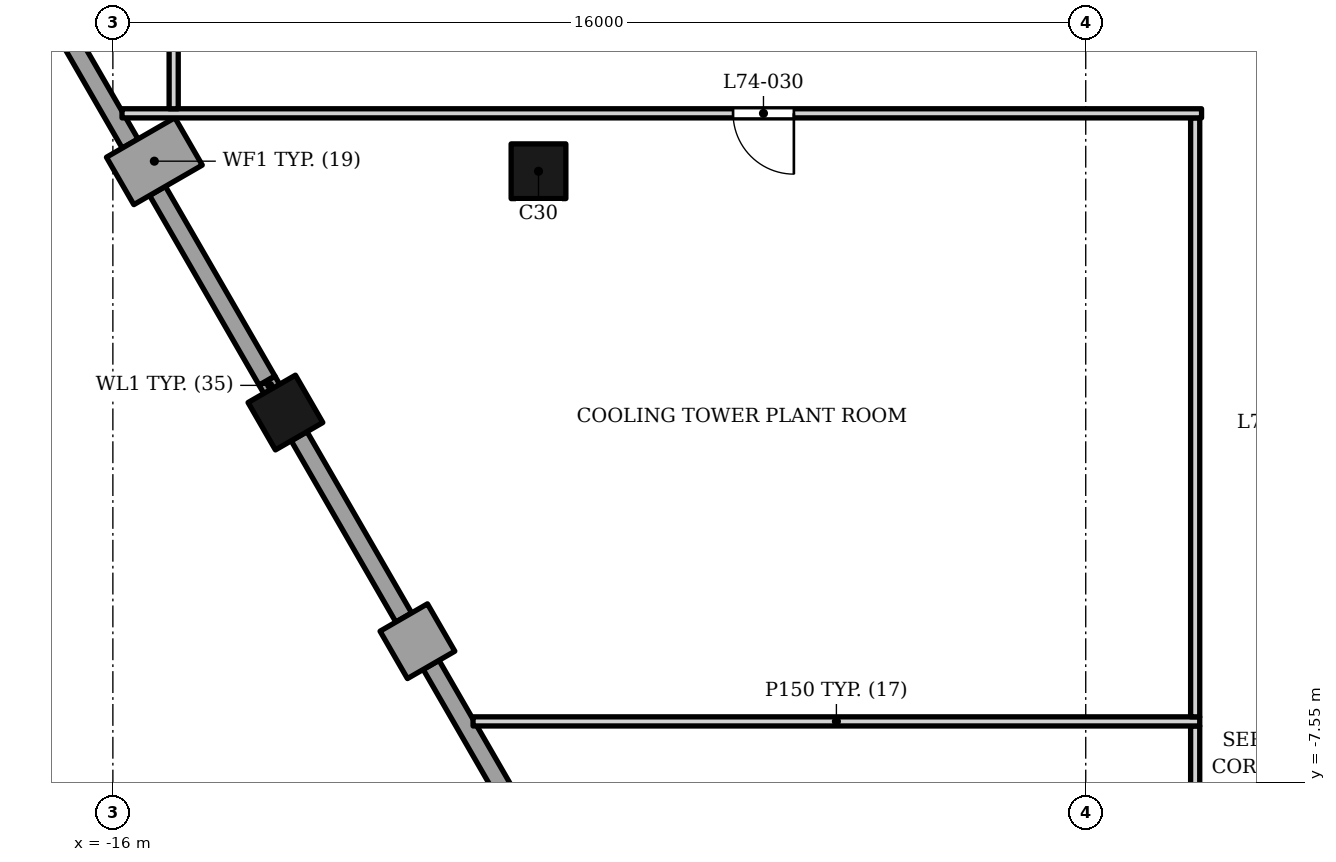
"""IFC4 building model, lengths in metres.
Left out: names, types, materials, properties, quantities, classifications, styles, units other than length and angle.
Written with IfcOpenShell. Run it as: python <this file> out.ifc"""

import sys

from ifc_helpers import new_model, si_unit, direction, frame, frame_2d, origin, origin_2d, place, context, subcontext, project, spatial, polyline, rectangle, outline, extrude, element, fill, save


model = new_model("IFC4")
c1 = context("Model", 3, precision=1e-05, world=origin(), true_north=direction((0.0, 1.0)))
c2 = subcontext(c1, "Body", "Model", "MODEL_VIEW")
j1 = project(units=[si_unit("LENGTHUNIT", "METRE"), si_unit("PLANEANGLEUNIT", "RADIAN")], contexts=[c1])
p1 = place(None, origin())
s1 = spatial("IfcSite", under=j1, at=p1, CompositionType="ELEMENT")
p2 = place(p1, origin())
s2 = spatial("IfcBuilding", under=s1, at=p2, CompositionType="ELEMENT")
p3 = place(p2, frame((0.0, 0.0, 315.5)))
s3 = spatial("IfcBuildingStorey", under=s2, at=p3, CompositionType="ELEMENT", Elevation=315.5)
for number, where, z_axis, x_axis in (
    (1, (-9.0, 2.5, 0.0), (0.0, 0.0, 1.0), (1.0, 0.0, 0.0)),
    (2, (-13.162, -1.468, 0.0), (0.0, 0.0, 1.0), (0.5, -0.866, 0.0)),
):
    element("IfcColumn", number, at=place(p3, frame(where, z_axis=z_axis, x_axis=x_axis)), inside=s3, PredefinedType="COLUMN", context=c2, shape_type="SweptSolid", body=[
        extrude(rectangle(XDim=0.9, YDim=0.9, at=origin_2d()), origin(), (0.0, 0.0, 1.0), 5.0),
    ])
p4 = place(p3, frame((-15.881, 2.341, 0.0), z_axis=(0.0, 0.0, 1.0), x_axis=(0.86611990832, 0.499836277606, 0.0)))
e3 = element("IfcWall", 3, at=p4, inside=s3, PredefinedType="SOLIDWALL", context=c2, shape_type="SweptSolid", body=[
    extrude(rectangle(XDim=1.3, YDim=0.9, at=frame_2d((0.65, 0.0))), origin(), (0.0, 0.0, 1.0), 3.8),
])
p5 = place(p3, frame((-11.216, -4.839, 0.0), z_axis=(0.0, 0.0, 1.0), x_axis=(0.500223362819, -0.865896406789, 0.0)))
e4 = element("IfcWall", 4, at=p5, inside=s3, PredefinedType="SOLIDWALL", context=c2, shape_type="SweptSolid", body=[
    extrude(rectangle(XDim=0.9, YDim=0.9, at=frame_2d((0.45, 0.0))), origin(), (0.0, 0.0, 1.0), 3.8),
])
p6 = place(p3, origin())
e5 = element("IfcWall", 5, at=p6, inside=s3, PredefinedType="ELEMENTEDWALL", context=c2, shape_type="SweptSolid", body=[
    extrude(outline(polyline([(-15.586, 3.031), (-17.307, 6.011), (-17.567, 5.861), (-15.846, 2.88), (-15.586, 3.031)])), origin(), (0.0, 0.0, 1.0), 3.8),
])
p7 = place(p3, frame((-15.266, 2.176, 0.0), z_axis=(0.0, 0.0, 1.0), x_axis=(0.499961193289, -0.866047807691, 0.0)))
e6 = element("IfcWall", 6, at=p7, inside=s3, PredefinedType="ELEMENTEDWALL", context=c2, shape_type="SweptSolid", body=[
    extrude(rectangle(XDim=3.6, YDim=0.3, at=frame_2d((1.8, 0.0))), origin(), (0.0, 0.0, 1.0), 3.8),
])
p8 = place(p3, origin())
e7 = element("IfcWall", 7, at=p8, inside=s3, PredefinedType="ELEMENTEDWALL", context=c2, shape_type="SweptSolid", body=[
    extrude(outline(polyline([(-11.086, -4.764), (-12.807, -1.783), (-13.067, -1.933), (-11.346, -4.914), (-11.086, -4.764)])), origin(), (0.0, 0.0, 1.0), 3.8),
])
p9 = place(p3, frame((-10.766, -5.618, 0.0), z_axis=(0.0, 0.0, 1.0), x_axis=(0.499961193289, -0.866047807691, 0.0)))
e8 = element("IfcWall", 8, at=p9, inside=s3, PredefinedType="ELEMENTEDWALL", context=c2, shape_type="SweptSolid", body=[
    extrude(rectangle(XDim=3.6, YDim=0.3, at=frame_2d((1.8, 0.0))), origin(), (0.0, 0.0, 1.0), 3.8),
])
p10 = place(p3, frame((-13.55, -1.096, 0.0), z_axis=(0.0, 0.0, 1.0), x_axis=(0.865778900179, 0.500426713919, 0.0)))
e9 = element("IfcWall", 9, at=p10, inside=s3, PredefinedType="ELEMENTEDWALL", context=c2, shape_type="SweptSolid", body=[
    extrude(rectangle(XDim=0.3, YDim=0.176, at=frame_2d((0.15, 0.0))), origin(), (0.0, 0.0, 1.0), 3.8),
])
p11 = place(p3, frame((1.8, -18.001, 0.0), z_axis=(0.0, 0.0, 1.0), x_axis=(0.0, 1.0, 0.0)))
e10 = element("IfcWall", 10, at=p11, inside=s3, PredefinedType="PARTITIONING", context=c2, shape_type="SweptSolid", body=[
    extrude(outline(polyline([(0.0, 0.0), (11.378, 0.0), (11.378, 4.8), (1.261, 4.8), (0.0, 3.742), (0.0, 0.0)])), frame((0.0, 0.075, 0.0), z_axis=(0.0, -1.0, 0.0), x_axis=(1.0, 0.0, 0.0)), (0.0, 0.0, 1.0), 0.15),
])
p12 = place(p11, frame((5.453, 0.0, 0.0)))
e11 = element("IfcOpeningElement", 11, at=p12, cuts=e10, PredefinedType="OPENING", context=c2, shape_type="SweptSolid", body=[
    extrude(rectangle(XDim=1.0, YDim=2.1, at=frame_2d((0.5, 1.05))), frame((0.0, 0.085, 0.0), z_axis=(0.0, -1.0, 0.0), x_axis=(1.0, 0.0, 0.0)), (0.0, 0.0, 1.0), 0.17),
])
p13 = place(p3, frame((-10.076, -6.547, 0.0), z_axis=(0.0, 0.0, 1.0), x_axis=(1.0, 0.0, 0.0)))
e12 = element("IfcWall", 12, at=p13, inside=s3, PredefinedType="PARTITIONING", context=c2, shape_type="SweptSolid", body=[
    extrude(rectangle(XDim=11.951, YDim=0.15, at=frame_2d((5.976, 0.0))), origin(), (0.0, 0.0, 1.0), 4.272),
])
p14 = place(p3, frame((1.8, -6.472, 0.0), z_axis=(0.0, 0.0, 1.0), x_axis=(0.0, 1.0, 0.0)))
e13 = element("IfcWall", 13, at=p14, inside=s3, PredefinedType="PARTITIONING", context=c2, shape_type="SweptSolid", body=[
    extrude(rectangle(XDim=9.85, YDim=0.15, at=frame_2d((4.925, 0.0))), origin(), (0.0, 0.0, 1.0), 4.8),
])
p15 = place(p3, frame((-15.85, 3.453, 0.0), z_axis=(0.0, 0.0, 1.0), x_axis=(1.0, 0.0, 0.0)))
e14 = element("IfcWall", 14, at=p15, inside=s3, PredefinedType="PARTITIONING", context=c2, shape_type="SweptSolid", body=[
    extrude(rectangle(XDim=17.755, YDim=0.15, at=frame_2d((8.877, 0.0))), origin(), (0.0, 0.0, 1.0), 4.1),
])
p16 = place(p15, frame((10.05, 0.0, 0.0)))
e15 = element("IfcOpeningElement", 15, at=p16, cuts=e14, PredefinedType="OPENING", context=c2, shape_type="SweptSolid", body=[
    extrude(rectangle(XDim=1.0, YDim=2.1, at=frame_2d((0.5, 1.05))), frame((0.0, 0.085, 0.0), z_axis=(0.0, -1.0, 0.0), x_axis=(1.0, 0.0, 0.0)), (0.0, 0.0, 1.0), 0.17),
])
p17 = place(p3, frame((-15.0, 3.528, 0.0), z_axis=(0.0, 0.0, 1.0), x_axis=(0.0, 1.0, 0.0)))
e16 = element("IfcWall", 16, at=p17, inside=s3, PredefinedType="PARTITIONING", context=c2, shape_type="SweptSolid", body=[
    extrude(rectangle(XDim=7.65, YDim=0.15, at=frame_2d((3.825, 0.0))), origin(), (0.0, 0.0, 1.0), 4.02),
])
p18 = place(p17, frame((3.275, 0.0, 0.0)))
e17 = element("IfcOpeningElement", 17, at=p18, cuts=e16, PredefinedType="OPENING", context=c2, shape_type="SweptSolid", body=[
    extrude(rectangle(XDim=1.0, YDim=2.1, at=frame_2d((0.5, 1.05))), frame((0.0, 0.085, 0.0), z_axis=(0.0, -1.0, 0.0), x_axis=(1.0, 0.0, 0.0)), (0.0, 0.0, 1.0), 0.17),
])
p19 = place(p16, origin())
e18 = element("IfcDoor", 18, at=p19, inside=s3, OperationType="SINGLE_SWING_RIGHT", PredefinedType="DOOR", context=c2, shape_type="SweptSolid", body=[
    extrude(rectangle(XDim=1.0, YDim=2.1, at=frame_2d((0.5, 1.05))), frame((0.0, 0.025, 0.0), z_axis=(0.0, -1.0, 0.0), x_axis=(1.0, 0.0, 0.0)), (0.0, 0.0, 1.0), 0.05),
])
fill(e15, e18)
save(model, sys.argv[1])
